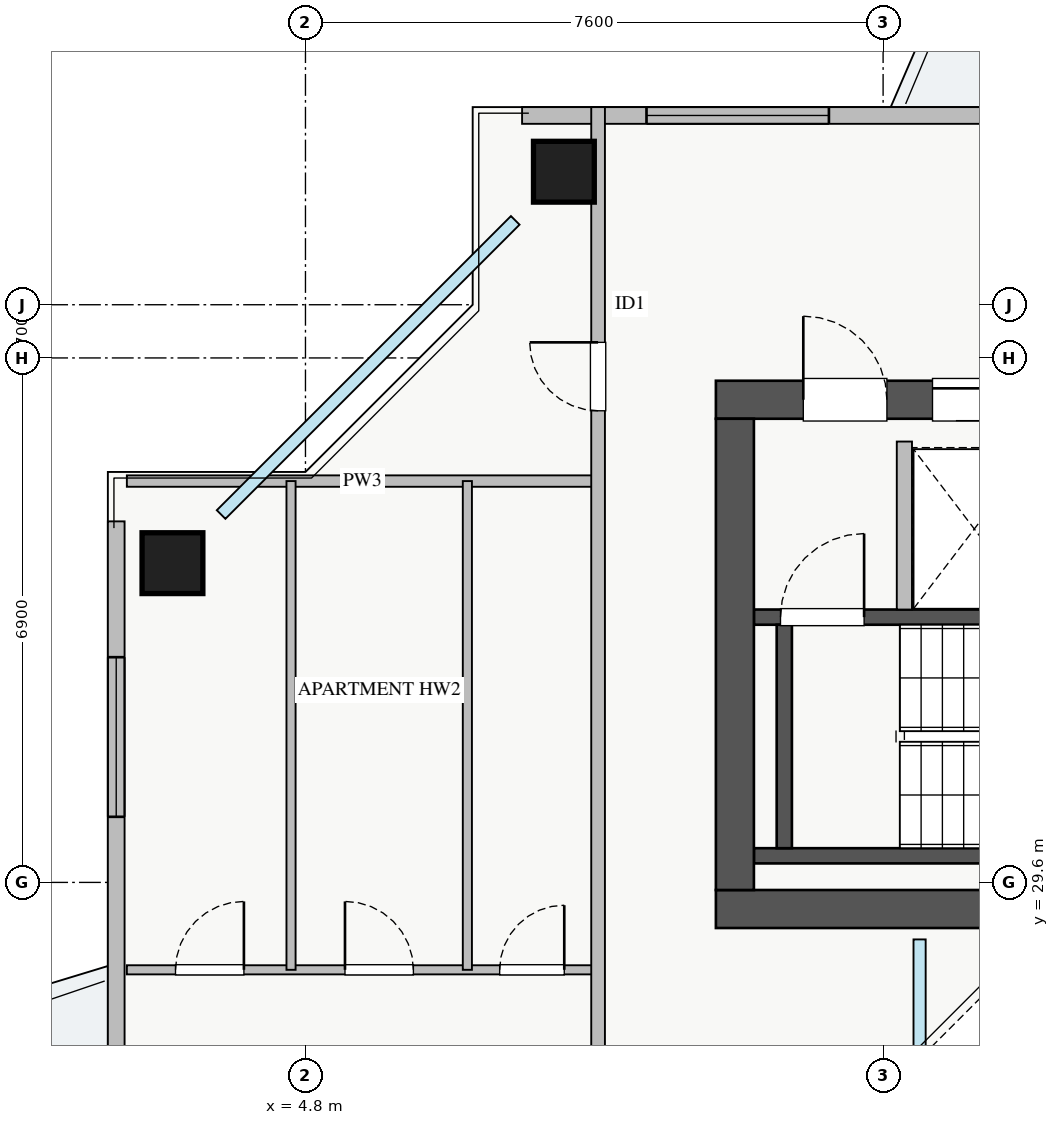
"""IFC4 building model, lengths in metres.
Left out: names, types, materials, properties, quantities, classifications, styles, units other than length and angle.
Written with IfcOpenShell. Run it as: python <this file> out.ifc"""

import sys

from ifc_helpers import new_model, si_unit, direction, frame, frame_2d, origin, origin_2d, place, context, subcontext, project, spatial, rectangle, extrude, source, transform, mapped, element, fill, save


model = new_model("IFC4")
c1 = context("Model", 3, precision=1e-05, world=origin(), true_north=direction((0.0, 1.0)))
c2 = subcontext(c1, "Body", "Model", "MODEL_VIEW")
j1 = project(units=[si_unit("LENGTHUNIT", "METRE"), si_unit("PLANEANGLEUNIT", "RADIAN")], contexts=[c1])
p1 = place(None, origin())
s1 = spatial("IfcSite", under=j1, at=p1, CompositionType="ELEMENT")
p2 = place(p1, origin())
s2 = spatial("IfcBuilding", under=s1, at=p2, CompositionType="ELEMENT")
p3 = place(p2, frame((0.0, 0.0, 193.75)))
s3 = spatial("IfcBuildingStorey", under=s2, at=p3, CompositionType="ELEMENT", Elevation=193.75)
p4 = place(p3, frame((12.68, 33.2, 0.0), z_axis=(0.0, 0.0, 1.0), x_axis=(1.0, 0.0, 0.0)))
e1 = element("IfcWall", 1, at=p4, inside=s3, PredefinedType="SHEAR", context=c2, shape_type="SweptSolid", body=[
    extrude(rectangle(XDim=1.94, YDim=0.18, at=frame_2d((0.97, 0.0))), origin(), (0.0, 0.0, 1.0), 3.07),
])
p5 = place(p3, frame((10.7, 29.95, 0.0), z_axis=(0.0, 0.0, 1.0), x_axis=(1.0, 0.0, 0.0)))
e2 = element("IfcWall", 2, at=p5, inside=s3, PredefinedType="SHEAR", context=c2, shape_type="SweptSolid", body=[
    extrude(rectangle(XDim=7.45, YDim=0.2, at=frame_2d((3.725, 0.0))), origin(), (0.0, 0.0, 1.0), 3.25),
])
p6 = place(p3, frame((10.7, 33.09, 0.0), z_axis=(0.0, 0.0, 1.0), x_axis=(1.0, 0.0, 0.0)))
e3 = element("IfcWall", 3, at=p6, inside=s3, PredefinedType="SHEAR", context=c2, shape_type="SweptSolid", body=[
    extrude(rectangle(XDim=7.45, YDim=0.2, at=frame_2d((3.725, 0.0))), origin(), (0.0, 0.0, 1.0), 3.25),
])
p7 = place(p6, frame((0.35, 0.0, 0.0)))
e4 = element("IfcOpeningElement", 4, at=p7, cuts=e3, PredefinedType="OPENING", context=c2, shape_type="SweptSolid", body=[
    extrude(rectangle(XDim=1.1, YDim=2.05, at=frame_2d((0.55, 1.025))), frame((0.0, 0.11, 0.0), z_axis=(0.0, -1.0, 0.0), x_axis=(1.0, 0.0, 0.0)), (0.0, 0.0, 1.0), 0.22),
])
p8 = place(p3, frame((11.1, 30.05, 0.0), z_axis=(0.0, 0.0, 1.0), x_axis=(0.0, 1.0, 0.0)))
e5 = element("IfcWall", 5, at=p8, inside=s3, PredefinedType="SHEAR", context=c2, shape_type="SweptSolid", body=[
    extrude(rectangle(XDim=2.94, YDim=0.2, at=frame_2d((1.47, 0.0))), origin(), (0.0, 0.0, 1.0), 3.25),
])
p9 = place(p3, frame((10.2, 29.25, 0.0), z_axis=(0.0, 0.0, 1.0), x_axis=(1.0, 0.0, 0.0)))
e6 = element("IfcWall", 6, at=p9, inside=s3, PredefinedType="SHEAR", context=c2, shape_type="SweptSolid", body=[
    extrude(rectangle(XDim=17.6, YDim=0.5, at=frame_2d((8.8, 0.0))), origin(), (0.0, 0.0, 1.0), 3.25),
])
p10 = place(p3, frame((10.2, 35.95, 0.0), z_axis=(0.0, 0.0, 1.0), x_axis=(1.0, 0.0, 0.0)))
e7 = element("IfcWall", 7, at=p10, inside=s3, PredefinedType="SHEAR", context=c2, shape_type="SweptSolid", body=[
    extrude(rectangle(XDim=17.6, YDim=0.5, at=frame_2d((8.8, 0.0))), origin(), (0.0, 0.0, 1.0), 3.25),
])
p11 = place(p10, frame((1.15, 0.0, 0.0)))
e8 = element("IfcOpeningElement", 8, at=p11, cuts=e7, PredefinedType="OPENING", context=c2, shape_type="SweptSolid", body=[
    extrude(rectangle(XDim=1.1, YDim=2.05, at=frame_2d((0.55, 1.025))), frame((0.0, 0.26, 0.0), z_axis=(0.0, -1.0, 0.0), x_axis=(1.0, 0.0, 0.0)), (0.0, 0.0, 1.0), 0.52),
])
p12 = place(p10, frame((8.3, 0.0, 0.0)))
e9 = element("IfcOpeningElement", 9, at=p12, cuts=e7, PredefinedType="OPENING", context=c2, shape_type="SweptSolid", body=[
    extrude(rectangle(XDim=1.1, YDim=2.05, at=frame_2d((0.55, 1.025))), frame((0.0, 0.26, 0.0), z_axis=(0.0, -1.0, 0.0), x_axis=(1.0, 0.0, 0.0)), (0.0, 0.0, 1.0), 0.52),
])
p13 = place(p10, frame((2.85, 0.0, 0.0)))
e10 = element("IfcOpeningElement", 10, at=p13, cuts=e7, PredefinedType="OPENING", context=c2, shape_type="SweptSolid", body=[
    extrude(rectangle(XDim=1.1, YDim=2.05, at=frame_2d((0.55, 1.025))), frame((0.0, 0.26, 0.0), z_axis=(0.0, -1.0, 0.0), x_axis=(1.0, 0.0, 0.0)), (0.0, 0.0, 1.0), 0.52),
])
p14 = place(p10, frame((5.8, 0.0, 0.0)))
e11 = element("IfcOpeningElement", 11, at=p14, cuts=e7, PredefinedType="OPENING", context=c2, shape_type="SweptSolid", body=[
    extrude(rectangle(XDim=1.0, YDim=2.05, at=frame_2d((0.5, 1.025))), frame((0.0, 0.26, 0.0), z_axis=(0.0, -1.0, 0.0), x_axis=(1.0, 0.0, 0.0)), (0.0, 0.0, 1.0), 0.52),
])
p15 = place(p10, frame((14.74, 0.0, 0.0)))
e12 = element("IfcOpeningElement", 12, at=p15, cuts=e7, PredefinedType="OPENING", context=c2, shape_type="SweptSolid", body=[
    extrude(rectangle(XDim=1.0, YDim=2.05, at=frame_2d((0.5, 1.025))), frame((0.0, 0.26, 0.0), z_axis=(0.0, -1.0, 0.0), x_axis=(1.0, 0.0, 0.0)), (0.0, 0.0, 1.0), 0.52),
])
p16 = place(p10, frame((10.005, 0.0, 0.0)))
e13 = element("IfcOpeningElement", 13, at=p16, cuts=e7, PredefinedType="OPENING", context=c2, shape_type="SweptSolid", body=[
    extrude(rectangle(XDim=1.0, YDim=2.05, at=frame_2d((0.5, 1.025))), frame((0.0, 0.26, 0.0), z_axis=(0.0, -1.0, 0.0), x_axis=(1.0, 0.0, 0.0)), (0.0, 0.0, 1.0), 0.52),
])
p17 = place(p10, frame((11.55, 0.0, 0.0)))
e14 = element("IfcOpeningElement", 14, at=p17, cuts=e7, PredefinedType="OPENING", context=c2, shape_type="SweptSolid", body=[
    extrude(rectangle(XDim=1.0, YDim=2.05, at=frame_2d((0.5, 1.025))), frame((0.0, 0.26, 0.0), z_axis=(0.0, -1.0, 0.0), x_axis=(1.0, 0.0, 0.0)), (0.0, 0.0, 1.0), 0.52),
])
p18 = place(p10, frame((13.215, 0.0, 0.0)))
e15 = element("IfcOpeningElement", 15, at=p18, cuts=e7, PredefinedType="OPENING", context=c2, shape_type="SweptSolid", body=[
    extrude(rectangle(XDim=1.0, YDim=2.05, at=frame_2d((0.5, 1.025))), frame((0.0, 0.26, 0.0), z_axis=(0.0, -1.0, 0.0), x_axis=(1.0, 0.0, 0.0)), (0.0, 0.0, 1.0), 0.52),
])
p19 = place(p3, frame((10.45, 29.5, 0.0), z_axis=(0.0, 0.0, 1.0), x_axis=(0.0, 1.0, 0.0)))
e16 = element("IfcWall", 16, at=p19, inside=s3, PredefinedType="SHEAR", context=c2, shape_type="SweptSolid", body=[
    extrude(rectangle(XDim=6.2, YDim=0.5, at=frame_2d((3.1, 0.0))), origin(), (0.0, 0.0, 1.0), 3.25),
])
m1 = source(origin(), c2, "Body", "SweptSolid", [
    extrude(rectangle(XDim=0.8, YDim=0.8, at=origin_2d()), origin(), (0.0, 0.0, 1.0), 3.25),
])
for number, where, z_axis, x_axis in (
    (17, (8.2, 38.95, 0.0), (0.0, 0.0, 1.0), (1.0, 0.0, 0.0)),
    (18, (3.05, 33.8, 0.0), (0.0, 0.0, 1.0), (1.0, 0.0, 0.0)),
):
    element("IfcColumn", number, at=place(p3, frame(where, z_axis=z_axis, x_axis=x_axis)), inside=s3, PredefinedType="COLUMN", context=c2, shape_type="MappedRepresentation", body=[
        mapped(m1, transform((0.0, 0.0, 0.0), x_axis=(1.0, 0.0, 0.0), y_axis=(0.0, 1.0, 0.0), z_axis=(0.0, 0.0, 1.0), scale=1.0)),
    ])
p20 = place(p3, frame((7.65, 39.69, 0.0), z_axis=(0.0, 0.0, 1.0), x_axis=(1.0, 0.0, 0.0)))
e19 = element("IfcWall", 19, at=p20, inside=s3, PredefinedType="STANDARD", context=c2, shape_type="SweptSolid", body=[
    extrude(rectangle(XDim=22.7, YDim=0.22, at=frame_2d((11.35, 0.0))), origin(), (0.0, 0.0, 1.0), 2.61),
])
p21 = place(p20, frame((12.2, 0.0, 0.0)))
e20 = element("IfcOpeningElement", 20, at=p21, cuts=e19, PredefinedType="OPENING", context=c2, shape_type="SweptSolid", body=[
    extrude(rectangle(XDim=1.2, YDim=2.1, at=frame_2d((0.6, 1.05))), frame((0.0, 0.12, 0.0), z_axis=(0.0, -1.0, 0.0), x_axis=(1.0, 0.0, 0.0)), (0.0, 0.0, 1.0), 0.24),
])
p22 = place(p20, frame((1.637, 0.0, 0.9)))
e21 = element("IfcOpeningElement", 21, at=p22, cuts=e19, PredefinedType="OPENING", context=c2, shape_type="SweptSolid", body=[
    extrude(rectangle(XDim=2.4, YDim=1.48, at=frame_2d((1.2, 0.74))), frame((0.0, 0.12, 0.0), z_axis=(0.0, -1.0, 0.0), x_axis=(1.0, 0.0, 0.0)), (0.0, 0.0, 1.0), 0.24),
])
p23 = place(p20, frame((7.612, 0.0, 0.9)))
e22 = element("IfcOpeningElement", 22, at=p23, cuts=e19, PredefinedType="OPENING", context=c2, shape_type="SweptSolid", body=[
    extrude(rectangle(XDim=1.8, YDim=1.45, at=frame_2d((0.9, 0.725))), frame((0.0, 0.12, 0.0), z_axis=(0.0, -1.0, 0.0), x_axis=(1.0, 0.0, 0.0)), (0.0, 0.0, 1.0), 0.24),
])
p24 = place(p20, frame((18.812, 0.0, 0.9)))
e23 = element("IfcOpeningElement", 23, at=p24, cuts=e19, PredefinedType="OPENING", context=c2, shape_type="SweptSolid", body=[
    extrude(rectangle(XDim=2.1, YDim=1.48, at=frame_2d((1.05, 0.74))), frame((0.0, 0.12, 0.0), z_axis=(0.0, -1.0, 0.0), x_axis=(1.0, 0.0, 0.0)), (0.0, 0.0, 1.0), 0.24),
])
p25 = place(p3, frame((2.31, 11.65, 0.0), z_axis=(0.0, 0.0, 1.0), x_axis=(0.0, 1.0, 0.0)))
e24 = element("IfcWall", 24, at=p25, inside=s3, PredefinedType="STANDARD", context=c2, shape_type="SweptSolid", body=[
    extrude(rectangle(XDim=22.7, YDim=0.22, at=frame_2d((11.35, 0.0))), origin(), (0.0, 0.0, 1.0), 2.61),
])
p26 = place(p25, frame((12.2, 0.0, 0.0)))
e25 = element("IfcOpeningElement", 25, at=p26, cuts=e24, PredefinedType="OPENING", context=c2, shape_type="SweptSolid", body=[
    extrude(rectangle(XDim=1.2, YDim=2.1, at=frame_2d((0.6, 1.05))), frame((0.0, 0.12, 0.0), z_axis=(0.0, -1.0, 0.0), x_axis=(1.0, 0.0, 0.0)), (0.0, 0.0, 1.0), 0.24),
])
p27 = place(p25, frame((1.638, 0.0, 0.9)))
e26 = element("IfcOpeningElement", 26, at=p27, cuts=e24, PredefinedType="OPENING", context=c2, shape_type="SweptSolid", body=[
    extrude(rectangle(XDim=2.4, YDim=1.48, at=frame_2d((1.2, 0.74))), frame((0.0, 0.12, 0.0), z_axis=(0.0, -1.0, 0.0), x_axis=(1.0, 0.0, 0.0)), (0.0, 0.0, 1.0), 0.24),
])
p28 = place(p25, frame((18.813, 0.0, 0.9)))
e27 = element("IfcOpeningElement", 27, at=p28, cuts=e24, PredefinedType="OPENING", context=c2, shape_type="SweptSolid", body=[
    extrude(rectangle(XDim=2.1, YDim=1.48, at=frame_2d((1.05, 0.74))), frame((0.0, 0.12, 0.0), z_axis=(0.0, -1.0, 0.0), x_axis=(1.0, 0.0, 0.0)), (0.0, 0.0, 1.0), 0.24),
])
p29 = place(p25, frame((5.16, 0.0, 0.9)))
e28 = element("IfcOpeningElement", 28, at=p29, cuts=e24, PredefinedType="OPENING", context=c2, shape_type="SweptSolid", body=[
    extrude(rectangle(XDim=0.9, YDim=1.2, at=frame_2d((0.45, 0.6))), frame((0.0, 0.12, 0.0), z_axis=(0.0, -1.0, 0.0), x_axis=(1.0, 0.0, 0.0)), (0.0, 0.0, 1.0), 0.24),
])
p30 = place(p25, frame((13.62, 0.0, 0.9)))
e29 = element("IfcOpeningElement", 29, at=p30, cuts=e24, PredefinedType="OPENING", context=c2, shape_type="SweptSolid", body=[
    extrude(rectangle(XDim=0.9, YDim=1.2, at=frame_2d((0.45, 0.6))), frame((0.0, 0.12, 0.0), z_axis=(0.0, -1.0, 0.0), x_axis=(1.0, 0.0, 0.0)), (0.0, 0.0, 1.0), 0.24),
])
p31 = place(p3, frame((12.68, 33.19, 0.0), z_axis=(0.0, 0.0, 1.0), x_axis=(0.0, 1.0, 0.0)))
e30 = element("IfcWall", 30, at=p31, inside=s3, PredefinedType="PARTITIONING", context=c2, shape_type="SweptSolid", body=[
    extrude(rectangle(XDim=2.21, YDim=0.2, at=frame_2d((1.105, 0.0))), origin(), (0.0, 0.0, 1.0), 3.07),
])
p32 = place(p3, frame((2.45, 34.88, 0.0), z_axis=(0.0, 0.0, 1.0), x_axis=(1.0, 0.0, 0.0)))
e31 = element("IfcWall", 31, at=p32, inside=s3, PredefinedType="PARTITIONING", context=c2, shape_type="SweptSolid", body=[
    extrude(rectangle(XDim=6.2, YDim=0.15, at=frame_2d((3.1, 0.0))), origin(), (0.0, 0.0, 1.0), 3.07),
])
p33 = place(p3, frame((2.45, 28.45, 0.0), z_axis=(0.0, 0.0, 1.0), x_axis=(1.0, 0.0, 0.0)))
e32 = element("IfcWall", 32, at=p33, inside=s3, PredefinedType="PLUMBINGWALL", context=c2, shape_type="SweptSolid", body=[
    extrude(rectangle(XDim=6.2, YDim=0.12, at=frame_2d((3.1, 0.0))), origin(), (0.0, 0.0, 1.0), 3.07),
])
p34 = place(p33, frame((0.64, 0.0, 0.0)))
e33 = element("IfcOpeningElement", 33, at=p34, cuts=e32, PredefinedType="OPENING", context=c2, shape_type="SweptSolid", body=[
    extrude(rectangle(XDim=0.9, YDim=2.05, at=frame_2d((0.45, 1.025))), frame((0.0, 0.07, 0.0), z_axis=(0.0, -1.0, 0.0), x_axis=(1.0, 0.0, 0.0)), (0.0, 0.0, 1.0), 0.14),
])
p35 = place(p33, frame((2.87, 0.0, 0.0)))
e34 = element("IfcOpeningElement", 34, at=p35, cuts=e32, PredefinedType="OPENING", context=c2, shape_type="SweptSolid", body=[
    extrude(rectangle(XDim=0.9, YDim=2.05, at=frame_2d((0.45, 1.025))), frame((0.0, 0.07, 0.0), z_axis=(0.0, -1.0, 0.0), x_axis=(1.0, 0.0, 0.0)), (0.0, 0.0, 1.0), 0.14),
])
p36 = place(p33, frame((4.905, 0.0, 0.0)))
e35 = element("IfcOpeningElement", 35, at=p36, cuts=e32, PredefinedType="OPENING", context=c2, shape_type="SweptSolid", body=[
    extrude(rectangle(XDim=0.85, YDim=2.05, at=frame_2d((0.425, 1.025))), frame((0.0, 0.07, 0.0), z_axis=(0.0, -1.0, 0.0), x_axis=(1.0, 0.0, 0.0)), (0.0, 0.0, 1.0), 0.14),
])
for number, where, z_axis, x_axis in (
    (36, (4.61, 28.45, 0.0), (0.0, 0.0, 1.0), (0.0, 1.0, 0.0)),
    (37, (6.93, 28.45, 0.0), (0.0, 0.0, 1.0), (0.0, 1.0, 0.0)),
):
    element("IfcWall", number, at=place(p3, frame(where, z_axis=z_axis, x_axis=x_axis)), inside=s3, PredefinedType="PLUMBINGWALL", context=c2, shape_type="SweptSolid", body=[
        extrude(rectangle(XDim=6.43, YDim=0.12, at=frame_2d((3.215, 0.0))), origin(), (0.0, 0.0, 1.0), 3.07),
    ])
p37 = place(p3, frame((8.65, 6.2, 0.0), z_axis=(0.0, 0.0, 1.0), x_axis=(0.0, 1.0, 0.0)))
e38 = element("IfcWall", 38, at=p37, inside=s3, PredefinedType="PARTITIONING", context=c2, shape_type="SweptSolid", body=[
    extrude(rectangle(XDim=33.6, YDim=0.18, at=frame_2d((16.8, 0.0))), origin(), (0.0, 0.0, 1.0), 3.07),
])
p38 = place(p37, frame((29.605, 0.0, 0.0)))
e39 = element("IfcOpeningElement", 39, at=p38, cuts=e38, PredefinedType="OPENING", context=c2, shape_type="SweptSolid", body=[
    extrude(rectangle(XDim=0.9, YDim=2.05, at=frame_2d((0.45, 1.025))), frame((0.0, 0.1, 0.0), z_axis=(0.0, -1.0, 0.0), x_axis=(1.0, 0.0, 0.0)), (0.0, 0.0, 1.0), 0.2),
])
p39 = place(p37, frame((2.92, 0.0, 0.0)))
e40 = element("IfcOpeningElement", 40, at=p39, cuts=e38, PredefinedType="OPENING", context=c2, shape_type="SweptSolid", body=[
    extrude(rectangle(XDim=0.9, YDim=2.05, at=frame_2d((0.45, 1.025))), frame((0.0, 0.1, 0.0), z_axis=(0.0, -1.0, 0.0), x_axis=(1.0, 0.0, 0.0)), (0.0, 0.0, 1.0), 0.2),
])
p40 = place(p37, frame((6.965, 0.0, 0.0)))
e41 = element("IfcOpeningElement", 41, at=p40, cuts=e38, PredefinedType="OPENING", context=c2, shape_type="SweptSolid", body=[
    extrude(rectangle(XDim=1.0, YDim=2.05, at=frame_2d((0.5, 1.025))), frame((0.0, 0.1, 0.0), z_axis=(0.0, -1.0, 0.0), x_axis=(1.0, 0.0, 0.0)), (0.0, 0.0, 1.0), 0.2),
])
p41 = place(p37, frame((18.595, 0.0, 0.0)))
e42 = element("IfcOpeningElement", 42, at=p41, cuts=e38, PredefinedType="OPENING", context=c2, shape_type="SweptSolid", body=[
    extrude(rectangle(XDim=1.0, YDim=2.05, at=frame_2d((0.5, 1.025))), frame((0.0, 0.1, 0.0), z_axis=(0.0, -1.0, 0.0), x_axis=(1.0, 0.0, 0.0)), (0.0, 0.0, 1.0), 0.2),
])
m2 = source(origin(), c2, "Body", "SweptSolid", [
    extrude(rectangle(XDim=2.4, YDim=1.48, at=frame_2d((1.2, 0.74))), frame((0.0, 0.03, 0.0), z_axis=(0.0, -1.0, 0.0), x_axis=(1.0, 0.0, 0.0)), (0.0, 0.0, 1.0), 0.06),
])
p42 = place(p22, origin())
e43 = element("IfcWindow", 43, at=p42, inside=s3, PartitioningType="TRIPLE_PANEL_VERTICAL", PredefinedType="WINDOW", context=c2, shape_type="MappedRepresentation", body=[
    mapped(m2, transform((0.0, 0.0, 0.0), x_axis=(1.0, 0.0, 0.0), y_axis=(0.0, 1.0, 0.0), z_axis=(0.0, 0.0, 1.0), scale=1.0)),
])
fill(e21, e43)
m3 = source(origin(), c2, "Body", "SweptSolid", [
    extrude(rectangle(XDim=2.1, YDim=1.48, at=frame_2d((1.05, 0.74))), frame((0.0, 0.03, 0.0), z_axis=(0.0, -1.0, 0.0), x_axis=(1.0, 0.0, 0.0)), (0.0, 0.0, 1.0), 0.06),
])
p43 = place(p28, origin())
e44 = element("IfcWindow", 44, at=p43, inside=s3, PartitioningType="TRIPLE_PANEL_VERTICAL", PredefinedType="WINDOW", context=c2, shape_type="MappedRepresentation", body=[
    mapped(m3, transform((0.0, 0.0, 0.0), x_axis=(1.0, 0.0, 0.0), y_axis=(0.0, 1.0, 0.0), z_axis=(0.0, 0.0, 1.0), scale=1.0)),
])
fill(e27, e44)
m4 = source(origin(), c2, "Body", "SweptSolid", [
    extrude(rectangle(XDim=1.1, YDim=2.05, at=frame_2d((0.55, 1.025))), frame((0.0, 0.025, 0.0), z_axis=(0.0, -1.0, 0.0), x_axis=(1.0, 0.0, 0.0)), (0.0, 0.0, 1.0), 0.05),
])
p44 = place(p11, origin())
e45 = element("IfcDoor", 45, at=p44, inside=s3, OperationType="SINGLE_SWING_LEFT", PredefinedType="DOOR", context=c2, shape_type="MappedRepresentation", body=[
    mapped(m4, transform((0.0, 0.0, 0.0), x_axis=(1.0, 0.0, 0.0), y_axis=(0.0, 1.0, 0.0), z_axis=(0.0, 0.0, 1.0), scale=1.0)),
])
fill(e8, e45)
p45 = place(p7, origin())
e46 = element("IfcDoor", 46, at=p45, inside=s3, OperationType="SINGLE_SWING_RIGHT", PredefinedType="DOOR", context=c2, shape_type="MappedRepresentation", body=[
    mapped(m4, transform((0.0, 0.0, 0.0), x_axis=(1.0, 0.0, 0.0), y_axis=(0.0, 1.0, 0.0), z_axis=(0.0, 0.0, 1.0), scale=1.0)),
])
fill(e4, e46)
p46 = place(p13, origin())
e47 = element("IfcDoor", 47, at=p46, inside=s3, OperationType="SLIDING_TO_LEFT", PredefinedType="DOOR", context=c2, shape_type="MappedRepresentation", body=[
    mapped(m4, transform((0.0, 0.0, 0.0), x_axis=(1.0, 0.0, 0.0), y_axis=(0.0, 1.0, 0.0), z_axis=(0.0, 0.0, 1.0), scale=1.0)),
])
fill(e10, e47)
m5 = source(origin(), c2, "Body", "SweptSolid", [
    extrude(rectangle(XDim=0.9, YDim=2.05, at=frame_2d((0.45, 1.025))), frame((0.0, 0.025, 0.0), z_axis=(0.0, -1.0, 0.0), x_axis=(1.0, 0.0, 0.0)), (0.0, 0.0, 1.0), 0.05),
])
p47 = place(p34, origin())
e48 = element("IfcDoor", 48, at=p47, inside=s3, OperationType="SINGLE_SWING_RIGHT", PredefinedType="DOOR", context=c2, shape_type="MappedRepresentation", body=[
    mapped(m5, transform((0.0, 0.0, 0.0), x_axis=(1.0, 0.0, 0.0), y_axis=(0.0, 1.0, 0.0), z_axis=(0.0, 0.0, 1.0), scale=1.0)),
])
fill(e33, e48)
p48 = place(p35, origin())
e49 = element("IfcDoor", 49, at=p48, inside=s3, OperationType="SINGLE_SWING_LEFT", PredefinedType="DOOR", context=c2, shape_type="MappedRepresentation", body=[
    mapped(m5, transform((0.0, 0.0, 0.0), x_axis=(1.0, 0.0, 0.0), y_axis=(0.0, 1.0, 0.0), z_axis=(0.0, 0.0, 1.0), scale=1.0)),
])
fill(e34, e49)
m6 = source(origin(), c2, "Body", "SweptSolid", [
    extrude(rectangle(XDim=0.85, YDim=2.05, at=frame_2d((0.425, 1.025))), frame((0.0, 0.025, 0.0), z_axis=(0.0, -1.0, 0.0), x_axis=(1.0, 0.0, 0.0)), (0.0, 0.0, 1.0), 0.05),
])
p49 = place(p36, origin())
e50 = element("IfcDoor", 50, at=p49, inside=s3, OperationType="SINGLE_SWING_RIGHT", PredefinedType="DOOR", context=c2, shape_type="MappedRepresentation", body=[
    mapped(m6, transform((0.0, 0.0, 0.0), x_axis=(1.0, 0.0, 0.0), y_axis=(0.0, 1.0, 0.0), z_axis=(0.0, 0.0, 1.0), scale=1.0)),
])
fill(e35, e50)
p50 = place(p38, origin())
e51 = element("IfcDoor", 51, at=p50, inside=s3, OperationType="SINGLE_SWING_RIGHT", PredefinedType="DOOR", context=c2, shape_type="MappedRepresentation", body=[
    mapped(m5, transform((0.0, 0.0, 0.0), x_axis=(1.0, 0.0, 0.0), y_axis=(0.0, 1.0, 0.0), z_axis=(0.0, 0.0, 1.0), scale=1.0)),
])
fill(e39, e51)
save(model, sys.argv[1])
